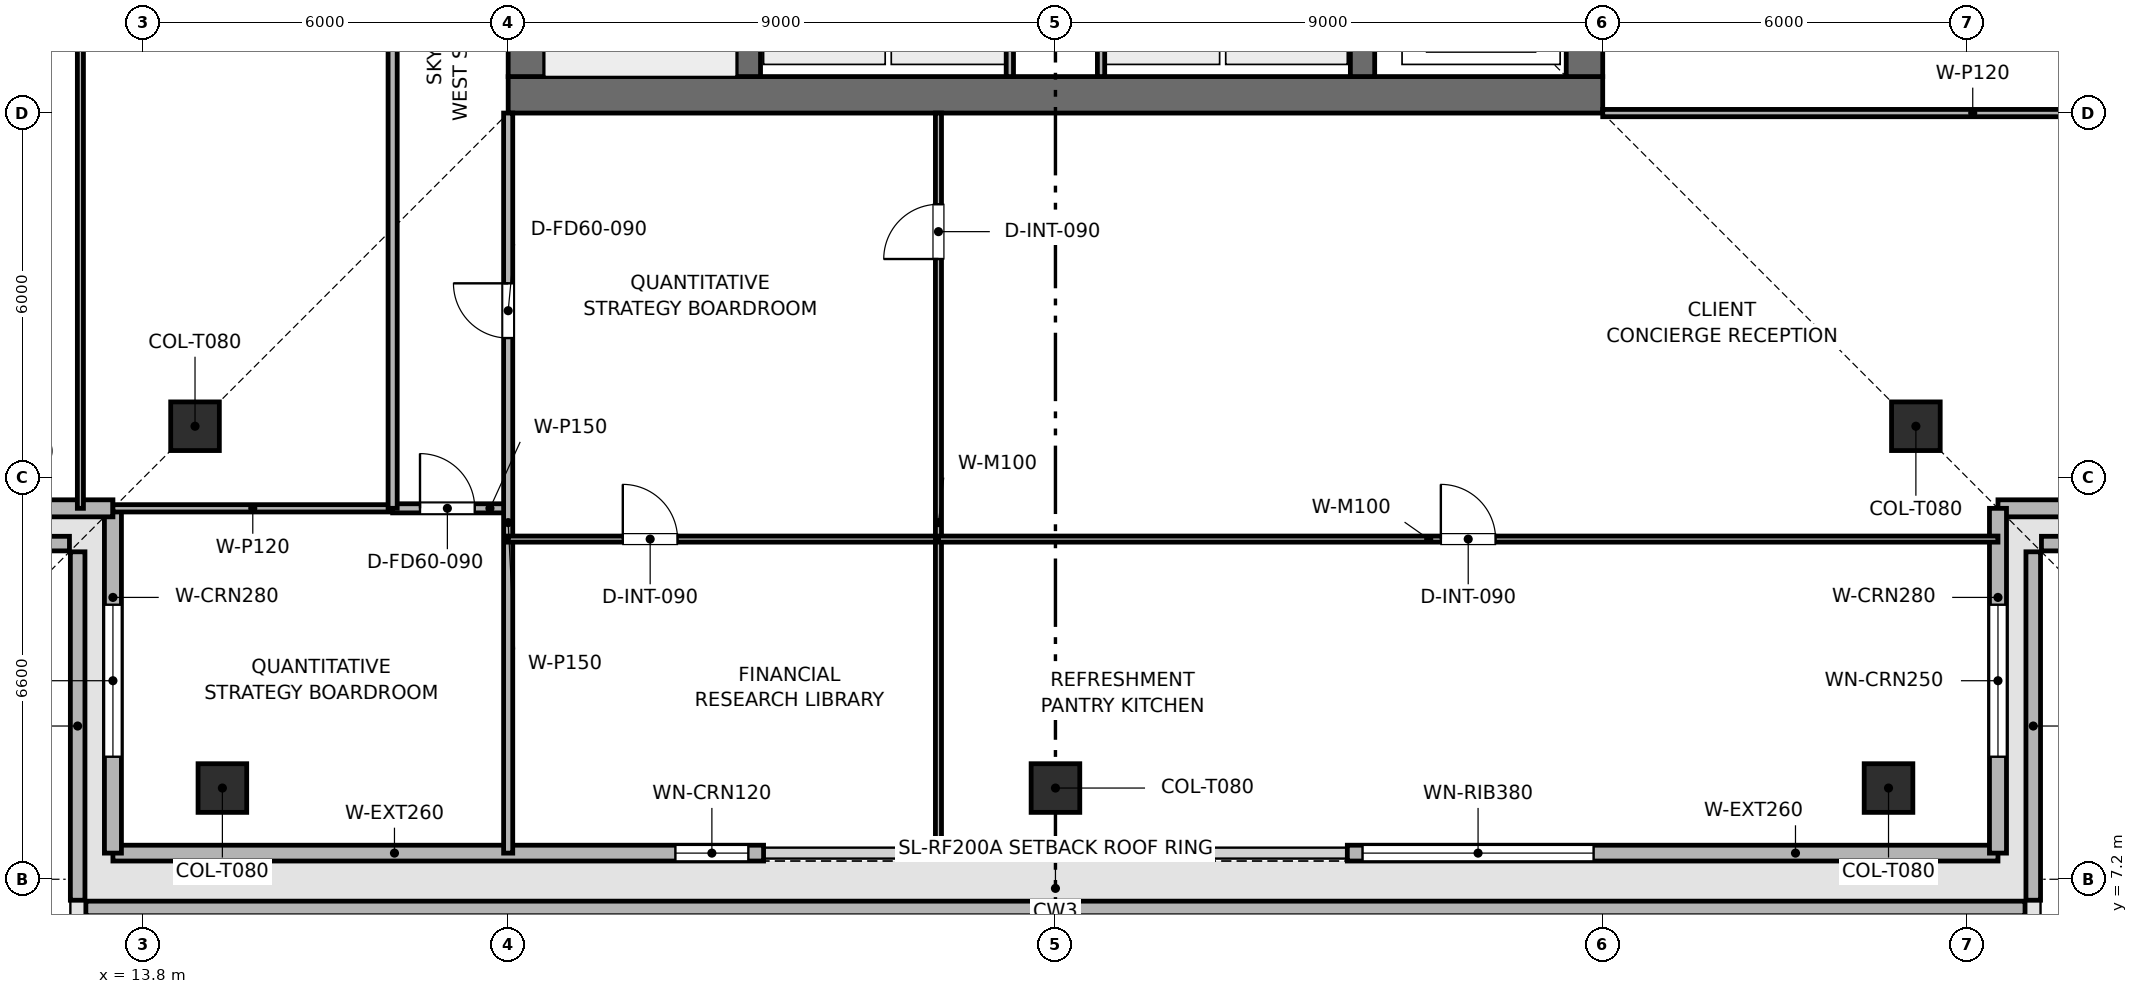
"""IFC4 building model, lengths in metres.
Left out: names, types, materials, properties, quantities, classifications, styles, units other than length and angle.
Written with IfcOpenShell. Run it as: python <this file> out.ifc"""

import sys

from ifc_helpers import new_model, si_unit, direction, frame, frame_2d, origin, origin_2d, place, context, subcontext, project, spatial, rectangle, extrude, element, fill, save


model = new_model("IFC4")
c1 = context("Model", 3, precision=1e-05, world=origin(), true_north=direction((0.0, 1.0)))
c2 = subcontext(c1, "Body", "Model", "MODEL_VIEW")
j1 = project(units=[si_unit("LENGTHUNIT", "METRE"), si_unit("PLANEANGLEUNIT", "RADIAN")], contexts=[c1])
p1 = place(None, origin())
s1 = spatial("IfcSite", under=j1, at=p1, CompositionType="ELEMENT")
p2 = place(p1, origin())
s2 = spatial("IfcBuilding", under=s1, at=p2, CompositionType="ELEMENT")
p3 = place(p2, frame((0.0, 0.0, 344.25)))
s3 = spatial("IfcBuildingStorey", under=s2, at=p3, CompositionType="ELEMENT", Elevation=344.25)
p4 = place(p3, frame((19.8, 20.1, 0.0), z_axis=(0.0, 0.0, 1.0), x_axis=(1.0, 0.0, 0.0)))
e1 = element("IfcWall", 1, at=p4, inside=s3, PredefinedType="SHEAR", context=c2, shape_type="SweptSolid", body=[
    extrude(rectangle(XDim=18.0, YDim=0.6, at=frame_2d((9.0, 0.0))), origin(), (0.0, 0.0, 1.0), 3.75),
])
p5 = place(p3, frame((20.1, 20.4, 0.0), z_axis=(0.0, 0.0, 1.0), x_axis=(0.0, 1.0, 0.0)))
e2 = element("IfcWall", 2, at=p5, inside=s3, PredefinedType="SHEAR", context=c2, shape_type="SweptSolid", body=[
    extrude(rectangle(XDim=16.8, YDim=0.6, at=frame_2d((8.4, 0.0))), origin(), (0.0, 0.0, 1.0), 3.75),
])
p6 = place(p5, frame((10.4, 0.0, 0.0)))
e3 = element("IfcOpeningElement", 3, at=p6, cuts=e2, PredefinedType="OPENING", context=c2, shape_type="SweptSolid", body=[
    extrude(rectangle(XDim=1.1, YDim=2.15, at=frame_2d((0.55, 1.075))), frame((0.0, 0.31, 0.0), z_axis=(0.0, -1.0, 0.0), x_axis=(1.0, 0.0, 0.0)), (0.0, 0.0, 1.0), 0.62),
])
p7 = place(p3, frame((37.5, 20.4, 0.0), z_axis=(0.0, 0.0, 1.0), x_axis=(0.0, 1.0, 0.0)))
e4 = element("IfcWall", 4, at=p7, inside=s3, PredefinedType="SHEAR", context=c2, shape_type="SweptSolid", body=[
    extrude(rectangle(XDim=16.8, YDim=0.6, at=frame_2d((8.4, 0.0))), origin(), (0.0, 0.0, 1.0), 3.75),
])
p8 = place(p7, frame((4.9, 0.0, 0.0)))
e5 = element("IfcOpeningElement", 5, at=p8, cuts=e4, PredefinedType="OPENING", context=c2, shape_type="SweptSolid", body=[
    extrude(rectangle(XDim=1.1, YDim=2.15, at=frame_2d((0.55, 1.075))), frame((0.0, 0.31, 0.0), z_axis=(0.0, -1.0, 0.0), x_axis=(1.0, 0.0, 0.0)), (0.0, 0.0, 1.0), 0.62),
])
for number, where, z_axis, x_axis in (
    (6, (23.75, 20.4, 0.0), (0.0, 0.0, 1.0), (0.0, 1.0, 0.0)),
    (7, (33.85, 20.4, 0.0), (0.0, 0.0, 1.0), (0.0, 1.0, 0.0)),
):
    element("IfcWall", number, at=place(p3, frame(where, z_axis=z_axis, x_axis=x_axis)), inside=s3, PredefinedType="SHEAR", context=c2, shape_type="SweptSolid", body=[
        extrude(rectangle(XDim=16.8, YDim=0.4, at=frame_2d((8.4, 0.0))), origin(), (0.0, 0.0, 1.0), 3.75),
    ])
for number, where, z_axis, x_axis in (
    (8, (15.1, 8.7, 0.003), (0.0, 0.0, 1.0), (1.0, 0.0, 0.0)),
    (9, (28.8, 8.7, 0.003), (0.0, 0.0, 1.0), (1.0, 0.0, 0.0)),
    (10, (42.5, 8.7, 0.003), (0.0, 0.0, 1.0), (1.0, 0.0, 0.0)),
    (11, (14.65, 14.65, 0.003), (0.0, 0.0, 1.0), (1.0, 0.0, 0.0)),
    (12, (42.95, 14.65, 0.003), (0.0, 0.0, 1.0), (1.0, 0.0, 0.0)),
):
    element("IfcColumn", number, at=place(p3, frame(where, z_axis=z_axis, x_axis=x_axis)), inside=s3, PredefinedType="COLUMN", context=c2, shape_type="SweptSolid", body=[
        extrude(rectangle(XDim=0.8, YDim=0.8, at=origin_2d()), origin(), (0.0, 0.0, 1.0), 3.504),
    ])
p9 = place(p3, frame((12.855, 6.72, 0.0), z_axis=(0.0, 0.0, 1.0), x_axis=(1.0, 0.0, 0.0)))
e13 = element("IfcWall", 13, at=p9, inside=s3, PredefinedType="PARAPET", context=c2, shape_type="SweptSolid", body=[
    extrude(rectangle(XDim=31.89, YDim=0.24, at=frame_2d((15.945, 0.0))), origin(), (0.0, 0.0, 1.0), 1.2),
])
p10 = place(p3, frame((44.88, 6.855, 0.0), z_axis=(0.0, 0.0, 1.0), x_axis=(0.0, 1.0, 0.0)))
e14 = element("IfcWall", 14, at=p10, inside=s3, PredefinedType="PARAPET", context=c2, shape_type="SweptSolid", body=[
    extrude(rectangle(XDim=5.73, YDim=0.24, at=frame_2d((2.865, 0.0))), origin(), (0.0, 0.0, 1.0), 1.2),
])
p11 = place(p3, frame((45.015, 12.72, 0.0), z_axis=(0.0, 0.0, 1.0), x_axis=(1.0, 0.0, 0.0)))
e15 = element("IfcWall", 15, at=p11, inside=s3, PredefinedType="PARAPET", context=c2, shape_type="SweptSolid", body=[
    extrude(rectangle(XDim=5.73, YDim=0.24, at=frame_2d((2.865, 0.0))), origin(), (0.0, 0.0, 1.0), 1.2),
])
for number, where, z_axis, x_axis in (
    (16, (6.855, 12.72, 0.0), (0.0, 0.0, 1.0), (1.0, 0.0, 0.0)),
    (17, (12.72, 12.585, 0.0), (0.0, 0.0, 1.0), (0.0, -1.0, 0.0)),
):
    element("IfcWall", number, at=place(p3, frame(where, z_axis=z_axis, x_axis=x_axis)), inside=s3, PredefinedType="PARAPET", context=c2, shape_type="SweptSolid", body=[
        extrude(rectangle(XDim=5.73, YDim=0.24, at=frame_2d((2.865, 0.0))), origin(), (0.0, 0.0, 1.0), 1.2),
    ])
p12 = place(p3, frame((44.3, 7.63, 0.0), z_axis=(0.0, 0.0, 1.0), x_axis=(-1.0, 0.0, 0.0)))
e18 = element("IfcWall", 18, at=p12, inside=s3, PredefinedType="SOLIDWALL", context=c2, shape_type="SweptSolid", body=[
    extrude(rectangle(XDim=10.7, YDim=0.26, at=frame_2d((5.35, 0.0))), origin(), (0.0, 0.0, 1.0), 3.51),
])
p13 = place(p12, frame((6.65, 0.0, 0.9)))
e19 = element("IfcOpeningElement", 19, at=p13, cuts=e18, PredefinedType="OPENING", context=c2, shape_type="SweptSolid", body=[
    extrude(rectangle(XDim=3.8, YDim=1.9, at=frame_2d((1.9, 0.95))), frame((0.0, 0.14, 0.0), z_axis=(0.0, -1.0, 0.0), x_axis=(1.0, 0.0, 0.0)), (0.0, 0.0, 1.0), 0.28),
])
p14 = place(p3, frame((24.0, 7.63, 0.0), z_axis=(0.0, 0.0, 1.0), x_axis=(-1.0, 0.0, 0.0)))
e20 = element("IfcWall", 20, at=p14, inside=s3, PredefinedType="SOLIDWALL", context=c2, shape_type="SweptSolid", body=[
    extrude(rectangle(XDim=10.7, YDim=0.26, at=frame_2d((5.35, 0.0))), origin(), (0.0, 0.0, 1.0), 3.51),
])
p15 = place(p14, frame((0.25, 0.0, 0.9)))
e21 = element("IfcOpeningElement", 21, at=p15, cuts=e20, PredefinedType="OPENING", context=c2, shape_type="SweptSolid", body=[
    extrude(rectangle(XDim=1.2, YDim=2.1, at=frame_2d((0.6, 1.05))), frame((0.0, 0.14, 0.0), z_axis=(0.0, -1.0, 0.0), x_axis=(1.0, 0.0, 0.0)), (0.0, 0.0, 1.0), 0.28),
])
p16 = place(p3, frame((13.3, 7.63, 0.0), z_axis=(0.0, 0.0, 1.0), x_axis=(0.0, 1.0, 0.0)))
e22 = element("IfcWall", 22, at=p16, inside=s3, PredefinedType="SOLIDWALL", context=c2, shape_type="SweptSolid", body=[
    extrude(rectangle(XDim=5.67, YDim=0.28, at=frame_2d((2.835, 0.0))), origin(), (0.0, 0.0, 1.0), 3.51),
])
p17 = place(p16, frame((1.585, 0.0, 0.9)))
e23 = element("IfcOpeningElement", 23, at=p17, cuts=e22, PredefinedType="OPENING", context=c2, shape_type="SweptSolid", body=[
    extrude(rectangle(XDim=2.5, YDim=1.9, at=frame_2d((1.25, 0.95))), frame((0.0, 0.15, 0.0), z_axis=(0.0, -1.0, 0.0), x_axis=(1.0, 0.0, 0.0)), (0.0, 0.0, 1.0), 0.3),
])
p18 = place(p3, frame((13.3, 13.3, 0.0), z_axis=(0.0, 0.0, 1.0), x_axis=(-1.0, 0.0, 0.0)))
e24 = element("IfcWall", 24, at=p18, inside=s3, PredefinedType="SOLIDWALL", context=c2, shape_type="SweptSolid", body=[
    extrude(rectangle(XDim=5.67, YDim=0.28, at=frame_2d((2.835, 0.0))), origin(), (0.0, 0.0, 1.0), 3.51),
])
p19 = place(p18, frame((1.585, 0.0, 0.9)))
e25 = element("IfcOpeningElement", 25, at=p19, cuts=e24, PredefinedType="OPENING", context=c2, shape_type="SweptSolid", body=[
    extrude(rectangle(XDim=2.5, YDim=1.9, at=frame_2d((1.25, 0.95))), frame((0.0, 0.15, 0.0), z_axis=(0.0, -1.0, 0.0), x_axis=(1.0, 0.0, 0.0)), (0.0, 0.0, 1.0), 0.3),
])
p20 = place(p3, frame((49.97, 13.3, 0.0), z_axis=(0.0, 0.0, 1.0), x_axis=(-1.0, 0.0, 0.0)))
e26 = element("IfcWall", 26, at=p20, inside=s3, PredefinedType="SOLIDWALL", context=c2, shape_type="SweptSolid", body=[
    extrude(rectangle(XDim=5.67, YDim=0.28, at=frame_2d((2.835, 0.0))), origin(), (0.0, 0.0, 1.0), 3.51),
])
p21 = place(p20, frame((1.585, 0.0, 0.9)))
e27 = element("IfcOpeningElement", 27, at=p21, cuts=e26, PredefinedType="OPENING", context=c2, shape_type="SweptSolid", body=[
    extrude(rectangle(XDim=2.5, YDim=1.9, at=frame_2d((1.25, 0.95))), frame((0.0, 0.15, 0.0), z_axis=(0.0, -1.0, 0.0), x_axis=(1.0, 0.0, 0.0)), (0.0, 0.0, 1.0), 0.3),
])
p22 = place(p3, frame((44.3, 13.3, 0.0), z_axis=(0.0, 0.0, 1.0), x_axis=(0.0, -1.0, 0.0)))
e28 = element("IfcWall", 28, at=p22, inside=s3, PredefinedType="SOLIDWALL", context=c2, shape_type="SweptSolid", body=[
    extrude(rectangle(XDim=5.67, YDim=0.28, at=frame_2d((2.835, 0.0))), origin(), (0.0, 0.0, 1.0), 3.51),
])
p23 = place(p22, frame((1.585, 0.0, 0.9)))
e29 = element("IfcOpeningElement", 29, at=p23, cuts=e28, PredefinedType="OPENING", context=c2, shape_type="SweptSolid", body=[
    extrude(rectangle(XDim=2.5, YDim=1.9, at=frame_2d((1.25, 0.95))), frame((0.0, 0.15, 0.0), z_axis=(0.0, -1.0, 0.0), x_axis=(1.0, 0.0, 0.0)), (0.0, 0.0, 1.0), 0.3),
])
for number, where, z_axis, x_axis in (
    (30, (28.05, 20.4, 0.0), (0.0, 0.0, 1.0), (0.0, 1.0, 0.0)),
    (31, (29.55, 20.4, 0.0), (0.0, 0.0, 1.0), (0.0, 1.0, 0.0)),
):
    element("IfcWall", number, at=place(p3, frame(where, z_axis=z_axis, x_axis=x_axis)), inside=s3, PredefinedType="PARTITIONING", context=c2, shape_type="SweptSolid", body=[
        extrude(rectangle(XDim=2.75, YDim=0.12, at=frame_2d((1.375, 0.0))), origin(), (0.0, 0.0, 1.0), 3.51),
    ])
p24 = place(p3, frame((12.765, 13.3, 0.0), z_axis=(0.0, 0.0, 1.0), x_axis=(0.0, 1.0, 0.0)))
e32 = element("IfcWall", 32, at=p24, inside=s3, PredefinedType="MOVABLE", context=c2, shape_type="SweptSolid", body=[
    extrude(rectangle(XDim=26.4, YDim=0.1, at=frame_2d((13.2, 0.0))), origin(), (0.0, 0.0, 1.0), 3.095),
])
p25 = place(p24, frame((8.567, 0.0, 0.0)))
e33 = element("IfcOpeningElement", 33, at=p25, cuts=e32, PredefinedType="OPENING", context=c2, shape_type="SweptSolid", body=[
    extrude(rectangle(XDim=0.9, YDim=2.1, at=frame_2d((0.45, 1.05))), frame((0.0, 0.06, 0.0), z_axis=(0.0, -1.0, 0.0), x_axis=(1.0, 0.0, 0.0)), (0.0, 0.0, 1.0), 0.12),
])
p26 = place(p3, frame((13.3, 13.3, 0.0), z_axis=(0.0, 0.0, 1.0), x_axis=(1.0, 0.0, 0.0)))
e34 = element("IfcWall", 34, at=p26, inside=s3, PredefinedType="PARTITIONING", context=c2, shape_type="SweptSolid", body=[
    extrude(rectangle(XDim=4.6, YDim=0.12, at=frame_2d((2.3, 0.0))), origin(), (0.0, 0.0, 1.0), 3.195),
])
p27 = place(p3, frame((17.9, 13.3, 0.0), z_axis=(0.0, 0.0, 1.0), x_axis=(1.0, 0.0, 0.0)))
e35 = element("IfcWall", 35, at=p27, inside=s3, PredefinedType="PARTITIONING", context=c2, shape_type="SweptSolid", body=[
    extrude(rectangle(XDim=1.9, YDim=0.15, at=frame_2d((0.95, 0.0))), origin(), (0.0, 0.0, 1.0), 3.51),
])
p28 = place(p27, frame((0.45, 0.0, 0.0)))
e36 = element("IfcOpeningElement", 36, at=p28, cuts=e35, PredefinedType="OPENING", context=c2, shape_type="SweptSolid", body=[
    extrude(rectangle(XDim=0.9, YDim=2.1, at=frame_2d((0.45, 1.05))), frame((0.0, 0.085, 0.0), z_axis=(0.0, -1.0, 0.0), x_axis=(1.0, 0.0, 0.0)), (0.0, 0.0, 1.0), 0.17),
])
p29 = place(p3, frame((19.8, 7.63, 0.0), z_axis=(0.0, 0.0, 1.0), x_axis=(0.0, 1.0, 0.0)))
e37 = element("IfcWall", 37, at=p29, inside=s3, PredefinedType="PARTITIONING", context=c2, shape_type="SweptSolid", body=[
    extrude(rectangle(XDim=12.17, YDim=0.15, at=frame_2d((6.085, 0.0))), origin(), (0.0, 0.0, 1.0), 3.095),
])
p30 = place(p29, frame((8.47, 0.0, 0.0)))
e38 = element("IfcOpeningElement", 38, at=p30, cuts=e37, PredefinedType="OPENING", context=c2, shape_type="SweptSolid", body=[
    extrude(rectangle(XDim=0.9, YDim=2.1, at=frame_2d((0.45, 1.05))), frame((0.0, 0.085, 0.0), z_axis=(0.0, -1.0, 0.0), x_axis=(1.0, 0.0, 0.0)), (0.0, 0.0, 1.0), 0.17),
])
p31 = place(p3, frame((19.8, 12.794, 0.0), z_axis=(0.0, 0.0, 1.0), x_axis=(1.0, 0.0, 0.0)))
e39 = element("IfcWall", 39, at=p31, inside=s3, PredefinedType="MOVABLE", context=c2, shape_type="SweptSolid", body=[
    extrude(rectangle(XDim=7.076, YDim=0.1, at=frame_2d((3.538, 0.0))), origin(), (0.0, 0.0, 1.0), 3.095),
])
p32 = place(p31, frame((1.885, 0.0, 0.0)))
e40 = element("IfcOpeningElement", 40, at=p32, cuts=e39, PredefinedType="OPENING", context=c2, shape_type="SweptSolid", body=[
    extrude(rectangle(XDim=0.9, YDim=2.1, at=frame_2d((0.45, 1.05))), frame((0.0, 0.06, 0.0), z_axis=(0.0, -1.0, 0.0), x_axis=(1.0, 0.0, 0.0)), (0.0, 0.0, 1.0), 0.12),
])
p33 = place(p3, frame((26.876, 7.63, 0.0), z_axis=(0.0, 0.0, 1.0), x_axis=(0.0, 1.0, 0.0)))
e41 = element("IfcWall", 41, at=p33, inside=s3, PredefinedType="MOVABLE", context=c2, shape_type="SweptSolid", body=[
    extrude(rectangle(XDim=12.17, YDim=0.1, at=frame_2d((6.085, 0.0))), origin(), (0.0, 0.0, 1.0), 3.135),
])
p34 = place(p33, frame((9.77, 0.0, 0.0)))
e42 = element("IfcOpeningElement", 42, at=p34, cuts=e41, PredefinedType="OPENING", context=c2, shape_type="SweptSolid", body=[
    extrude(rectangle(XDim=0.9, YDim=2.1, at=frame_2d((0.45, 1.05))), frame((0.0, 0.06, 0.0), z_axis=(0.0, -1.0, 0.0), x_axis=(1.0, 0.0, 0.0)), (0.0, 0.0, 1.0), 0.12),
])
p35 = place(p3, frame((26.876, 12.794, 0.0), z_axis=(0.0, 0.0, 1.0), x_axis=(1.0, 0.0, 0.0)))
e43 = element("IfcWall", 43, at=p35, inside=s3, PredefinedType="MOVABLE", context=c2, shape_type="SweptSolid", body=[
    extrude(rectangle(XDim=17.424, YDim=0.1, at=frame_2d((8.712, 0.0))), origin(), (0.0, 0.0, 1.0), 3.095),
])
p36 = place(p35, frame((8.262, 0.0, 0.0)))
e44 = element("IfcOpeningElement", 44, at=p36, cuts=e43, PredefinedType="OPENING", context=c2, shape_type="SweptSolid", body=[
    extrude(rectangle(XDim=0.9, YDim=2.1, at=frame_2d((0.45, 1.05))), frame((0.0, 0.06, 0.0), z_axis=(0.0, -1.0, 0.0), x_axis=(1.0, 0.0, 0.0)), (0.0, 0.0, 1.0), 0.12),
])
p37 = place(p3, frame((37.8, 19.8, 0.0), z_axis=(0.0, 0.0, 1.0), x_axis=(1.0, 0.0, 0.0)))
e45 = element("IfcWall", 45, at=p37, inside=s3, PredefinedType="PARTITIONING", context=c2, shape_type="SweptSolid", body=[
    extrude(rectangle(XDim=12.17, YDim=0.12, at=frame_2d((6.085, 0.0))), origin(), (0.0, 0.0, 1.0), 3.095),
])
p38 = place(p3, frame((17.9, 13.3, 0.0), z_axis=(0.0, 0.0, 1.0), x_axis=(0.0, 1.0, 0.0)))
e46 = element("IfcWall", 46, at=p38, inside=s3, PredefinedType="PARTITIONING", context=c2, shape_type="SweptSolid", body=[
    extrude(rectangle(XDim=26.4, YDim=0.15, at=frame_2d((13.2, 0.0))), origin(), (0.0, 0.0, 1.0), 3.095),
])
p39 = place(p38, frame((12.75, 0.0, 0.0)))
e47 = element("IfcOpeningElement", 47, at=p39, cuts=e46, PredefinedType="OPENING", context=c2, shape_type="SweptSolid", body=[
    extrude(rectangle(XDim=0.9, YDim=2.1, at=frame_2d((0.45, 1.05))), frame((0.0, 0.085, 0.0), z_axis=(0.0, -1.0, 0.0), x_axis=(1.0, 0.0, 0.0)), (0.0, 0.0, 1.0), 0.17),
])
p40 = place(p13, origin())
e48 = element("IfcWindow", 48, at=p40, inside=s3, PartitioningType="SINGLE_PANEL", PredefinedType="WINDOW", context=c2, shape_type="SweptSolid", body=[
    extrude(rectangle(XDim=3.8, YDim=1.9, at=frame_2d((1.9, 0.95))), frame((0.0, 0.03, 0.0), z_axis=(0.0, -1.0, 0.0), x_axis=(1.0, 0.0, 0.0)), (0.0, 0.0, 1.0), 0.06),
])
fill(e19, e48)
p41 = place(p15, origin())
e49 = element("IfcWindow", 49, at=p41, inside=s3, PartitioningType="SINGLE_PANEL", PredefinedType="WINDOW", context=c2, shape_type="SweptSolid", body=[
    extrude(rectangle(XDim=1.2, YDim=2.1, at=frame_2d((0.6, 1.05))), frame((0.0, 0.03, 0.0), z_axis=(0.0, -1.0, 0.0), x_axis=(1.0, 0.0, 0.0)), (0.0, 0.0, 1.0), 0.06),
])
fill(e21, e49)
p42 = place(p17, origin())
e50 = element("IfcWindow", 50, at=p42, inside=s3, PartitioningType="SINGLE_PANEL", PredefinedType="WINDOW", context=c2, shape_type="SweptSolid", body=[
    extrude(rectangle(XDim=2.5, YDim=1.9, at=frame_2d((1.25, 0.95))), frame((0.0, 0.03, 0.0), z_axis=(0.0, -1.0, 0.0), x_axis=(1.0, 0.0, 0.0)), (0.0, 0.0, 1.0), 0.06),
])
fill(e23, e50)
p43 = place(p23, origin())
e51 = element("IfcWindow", 51, at=p43, inside=s3, PartitioningType="SINGLE_PANEL", PredefinedType="WINDOW", context=c2, shape_type="SweptSolid", body=[
    extrude(rectangle(XDim=2.5, YDim=1.9, at=frame_2d((1.25, 0.95))), frame((0.0, 0.03, 0.0), z_axis=(0.0, -1.0, 0.0), x_axis=(1.0, 0.0, 0.0)), (0.0, 0.0, 1.0), 0.06),
])
fill(e29, e51)
p44 = place(p28, origin())
e52 = element("IfcDoor", 52, at=p44, inside=s3, OperationType="SINGLE_SWING_LEFT", PredefinedType="DOOR", context=c2, shape_type="SweptSolid", body=[
    extrude(rectangle(XDim=0.9, YDim=2.1, at=frame_2d((0.45, 1.05))), frame((0.0, 0.025, 0.0), z_axis=(0.0, -1.0, 0.0), x_axis=(1.0, 0.0, 0.0)), (0.0, 0.0, 1.0), 0.05),
])
fill(e36, e52)
p45 = place(p30, origin())
e53 = element("IfcDoor", 53, at=p45, inside=s3, OperationType="SINGLE_SWING_RIGHT", PredefinedType="DOOR", context=c2, shape_type="SweptSolid", body=[
    extrude(rectangle(XDim=0.9, YDim=2.1, at=frame_2d((0.45, 1.05))), frame((0.0, 0.025, 0.0), z_axis=(0.0, -1.0, 0.0), x_axis=(1.0, 0.0, 0.0)), (0.0, 0.0, 1.0), 0.05),
])
fill(e38, e53)
p46 = place(p32, origin())
e54 = element("IfcDoor", 54, at=p46, inside=s3, OperationType="SINGLE_SWING_LEFT", PredefinedType="DOOR", context=c2, shape_type="SweptSolid", body=[
    extrude(rectangle(XDim=0.9, YDim=2.1, at=frame_2d((0.45, 1.05))), frame((0.0, 0.025, 0.0), z_axis=(0.0, -1.0, 0.0), x_axis=(1.0, 0.0, 0.0)), (0.0, 0.0, 1.0), 0.05),
])
fill(e40, e54)
p47 = place(p34, origin())
e55 = element("IfcDoor", 55, at=p47, inside=s3, OperationType="SINGLE_SWING_LEFT", PredefinedType="DOOR", context=c2, shape_type="SweptSolid", body=[
    extrude(rectangle(XDim=0.9, YDim=2.1, at=frame_2d((0.45, 1.05))), frame((0.0, 0.025, 0.0), z_axis=(0.0, -1.0, 0.0), x_axis=(1.0, 0.0, 0.0)), (0.0, 0.0, 1.0), 0.05),
])
fill(e42, e55)
p48 = place(p36, origin())
e56 = element("IfcDoor", 56, at=p48, inside=s3, OperationType="SINGLE_SWING_LEFT", PredefinedType="DOOR", context=c2, shape_type="SweptSolid", body=[
    extrude(rectangle(XDim=0.9, YDim=2.1, at=frame_2d((0.45, 1.05))), frame((0.0, 0.025, 0.0), z_axis=(0.0, -1.0, 0.0), x_axis=(1.0, 0.0, 0.0)), (0.0, 0.0, 1.0), 0.05),
])
fill(e44, e56)
save(model, sys.argv[1])
